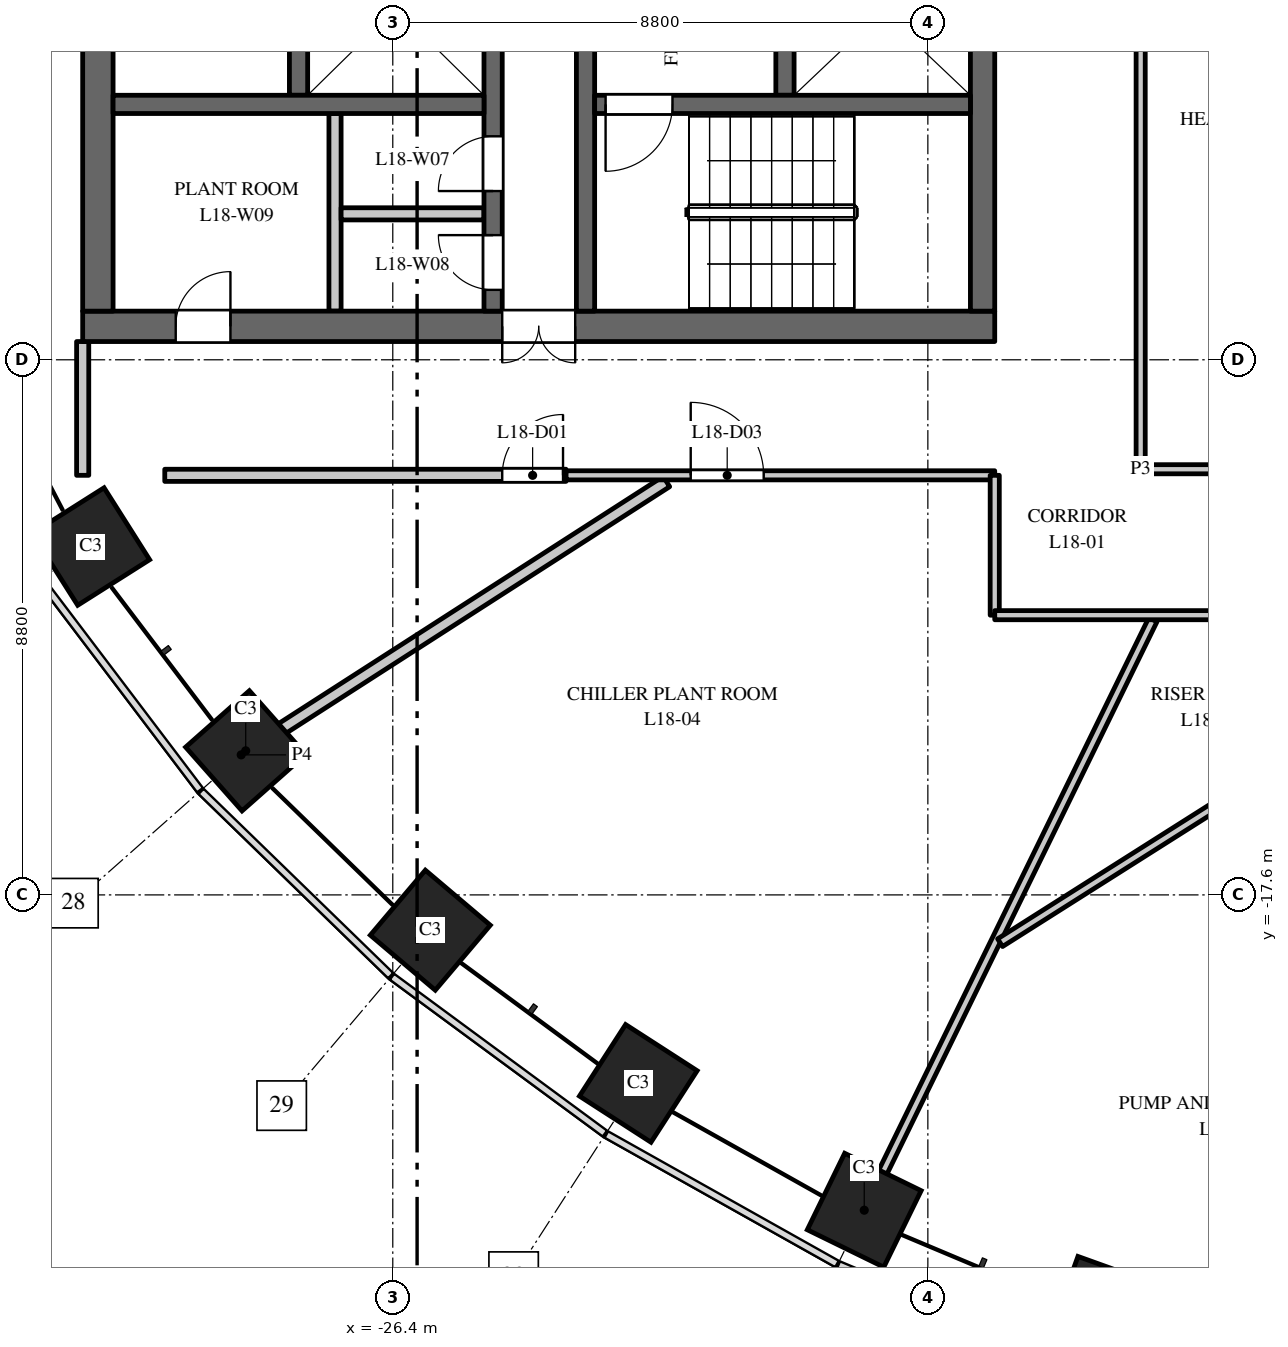
"""IFC4 building model, lengths in metres.
Left out: names, types, materials, properties, quantities, classifications, styles, units other than length and angle.
Written with IfcOpenShell. Run it as: python <this file> out.ifc"""

import sys

from ifc_helpers import new_model, si_unit, direction, frame, frame_2d, origin, origin_2d, place, context, subcontext, project, spatial, rectangle, extrude, element, fill, save


model = new_model("IFC4")
c1 = context("Model", 3, precision=1e-05, world=origin(), true_north=direction((0.0, 1.0)))
c2 = subcontext(c1, "Body", "Model", "MODEL_VIEW")
j1 = project(units=[si_unit("LENGTHUNIT", "METRE"), si_unit("PLANEANGLEUNIT", "RADIAN")], contexts=[c1])
p1 = place(None, origin())
s1 = spatial("IfcSite", under=j1, at=p1, CompositionType="ELEMENT")
p2 = place(p1, origin())
s2 = spatial("IfcBuilding", under=s1, at=p2, CompositionType="ELEMENT")
p3 = place(p2, frame((0.0, 0.0, 82.5)))
s3 = spatial("IfcBuildingStorey", under=s2, at=p3, CompositionType="ELEMENT", Elevation=82.5)
for number, where, z_axis, x_axis in (
    (1, (-31.365, -11.871, 0.0), (0.0, 0.0, 1.0), (0.535, -0.845, 0.0)),
    (2, (-28.819, -15.23, 0.0), (0.0, 0.0, 1.0), (0.663, -0.749, 0.0)),
    (3, (-25.783, -18.18, 0.0), (0.0, 0.0, 1.0), (0.763, -0.646, 0.0)),
    (4, (-22.362, -20.7, 0.0), (0.0, 0.0, 1.0), (0.84, -0.542, 0.0)),
    (5, (-18.646, -22.785, 0.0), (0.0, 0.0, 1.0), (0.898, -0.439, 0.0)),
    (6, (-14.709, -24.441, 0.0), (0.0, 0.0, 1.0), (0.941, -0.338, 0.0)),
):
    element("IfcColumn", number, at=place(p3, frame(where, z_axis=z_axis, x_axis=x_axis)), inside=s3, PredefinedType="COLUMN", context=c2, shape_type="SweptSolid", body=[
        extrude(rectangle(XDim=1.4, YDim=1.4, at=origin_2d()), origin(), (0.0, 0.0, 1.0), 5.5),
    ])
p4 = place(p3, frame((-16.5, -8.25, 0.0), z_axis=(0.0, 0.0, 1.0), x_axis=(-1.0, 0.0, 0.0)))
e7 = element("IfcWall", 7, at=p4, inside=s3, PredefinedType="SHEAR", context=c2, shape_type="SweptSolid", body=[
    extrude(rectangle(XDim=15.0, YDim=0.5, at=frame_2d((7.5, 0.0))), origin(), (0.0, 0.0, 1.0), 5.2),
])
p5 = place(p4, frame((6.9, 0.0, 0.0)))
e8 = element("IfcOpeningElement", 8, at=p5, cuts=e7, PredefinedType="OPENING", context=c2, shape_type="SweptSolid", body=[
    extrude(rectangle(XDim=1.2, YDim=2.1, at=frame_2d((0.6, 1.05))), frame((0.0, 0.26, 0.0), z_axis=(0.0, -1.0, 0.0), x_axis=(1.0, 0.0, 0.0)), (0.0, 0.0, 1.0), 0.52),
])
p6 = place(p4, frame((12.57, 0.0, 0.0)))
e9 = element("IfcOpeningElement", 9, at=p6, cuts=e7, PredefinedType="OPENING", context=c2, shape_type="SweptSolid", body=[
    extrude(rectangle(XDim=0.9, YDim=2.1, at=frame_2d((0.45, 1.05))), frame((0.0, 0.26, 0.0), z_axis=(0.0, -1.0, 0.0), x_axis=(1.0, 0.0, 0.0)), (0.0, 0.0, 1.0), 0.52),
])
p7 = place(p3, frame((-27.95, -4.45, 0.0), z_axis=(0.0, 0.0, 1.0), x_axis=(0.0, 1.0, 0.0)))
e10 = element("IfcWall", 10, at=p7, inside=s3, PredefinedType="SHEAR", context=c2, shape_type="SweptSolid", body=[
    extrude(rectangle(XDim=8.9, YDim=0.3, at=frame_2d((4.45, 0.0))), origin(), (0.0, 0.0, 1.0), 5.2),
])
p8 = place(p3, frame((-19.95, -4.45, 0.0), z_axis=(0.0, 0.0, 1.0), x_axis=(0.0, 1.0, 0.0)))
e11 = element("IfcWall", 11, at=p8, inside=s3, PredefinedType="SHEAR", context=c2, shape_type="SweptSolid", body=[
    extrude(rectangle(XDim=8.9, YDim=0.3, at=frame_2d((4.45, 0.0))), origin(), (0.0, 0.0, 1.0), 5.2),
])
p9 = place(p8, frame((0.775, 0.0, 0.0)))
e12 = element("IfcOpeningElement", 12, at=p9, cuts=e11, PredefinedType="OPENING", context=c2, shape_type="SweptSolid", body=[
    extrude(rectangle(XDim=1.2, YDim=2.1, at=frame_2d((0.6, 1.05))), frame((0.0, 0.16, 0.0), z_axis=(0.0, -1.0, 0.0), x_axis=(1.0, 0.0, 0.0)), (0.0, 0.0, 1.0), 0.32),
])
p10 = place(p8, frame((7.35, 0.0, 0.0)))
e13 = element("IfcOpeningElement", 13, at=p10, cuts=e11, PredefinedType="OPENING", context=c2, shape_type="SweptSolid", body=[
    extrude(rectangle(XDim=0.9, YDim=2.1, at=frame_2d((0.45, 1.05))), frame((0.0, 0.16, 0.0), z_axis=(0.0, -1.0, 0.0), x_axis=(1.0, 0.0, 0.0)), (0.0, 0.0, 1.0), 0.32),
])
p11 = place(p3, frame((-24.75, -8.0, 0.0), z_axis=(0.0, 0.0, 1.0), x_axis=(0.0, 1.0, 0.0)))
e14 = element("IfcWall", 14, at=p11, inside=s3, PredefinedType="SHEAR", context=c2, shape_type="SweptSolid", body=[
    extrude(rectangle(XDim=16.0, YDim=0.3, at=frame_2d((8.0, 0.0))), origin(), (0.0, 0.0, 1.0), 5.2),
])
p12 = place(p11, frame((4.425, 0.0, 0.0)))
e15 = element("IfcOpeningElement", 15, at=p12, cuts=e14, PredefinedType="OPENING", context=c2, shape_type="SweptSolid", body=[
    extrude(rectangle(XDim=1.1, YDim=2.1, at=frame_2d((0.55, 1.05))), frame((0.0, 0.16, 0.0), z_axis=(0.0, -1.0, 0.0), x_axis=(1.0, 0.0, 0.0)), (0.0, 0.0, 1.0), 0.32),
])
p13 = place(p11, frame((7.45, 0.0, 0.0)))
e16 = element("IfcOpeningElement", 16, at=p13, cuts=e14, PredefinedType="OPENING", context=c2, shape_type="SweptSolid", body=[
    extrude(rectangle(XDim=1.1, YDim=2.1, at=frame_2d((0.55, 1.05))), frame((0.0, 0.16, 0.0), z_axis=(0.0, -1.0, 0.0), x_axis=(1.0, 0.0, 0.0)), (0.0, 0.0, 1.0), 0.32),
])
p14 = place(p11, frame((10.425, 0.0, 0.0)))
e17 = element("IfcOpeningElement", 17, at=p14, cuts=e14, PredefinedType="OPENING", context=c2, shape_type="SweptSolid", body=[
    extrude(rectangle(XDim=1.2, YDim=2.1, at=frame_2d((0.6, 1.05))), frame((0.0, 0.16, 0.0), z_axis=(0.0, -1.0, 0.0), x_axis=(1.0, 0.0, 0.0)), (0.0, 0.0, 1.0), 0.32),
])
p15 = place(p11, frame((13.75, 0.0, 0.0)))
e18 = element("IfcOpeningElement", 18, at=p15, cuts=e14, PredefinedType="OPENING", context=c2, shape_type="SweptSolid", body=[
    extrude(rectangle(XDim=0.9, YDim=2.1, at=frame_2d((0.45, 1.05))), frame((0.0, 0.16, 0.0), z_axis=(0.0, -1.0, 0.0), x_axis=(1.0, 0.0, 0.0)), (0.0, 0.0, 1.0), 0.32),
])
p16 = place(p11, frame((1.975, 0.0, 0.0)))
e19 = element("IfcOpeningElement", 19, at=p16, cuts=e14, PredefinedType="OPENING", context=c2, shape_type="SweptSolid", body=[
    extrude(rectangle(XDim=0.9, YDim=2.1, at=frame_2d((0.45, 1.05))), frame((0.0, 0.16, 0.0), z_axis=(0.0, -1.0, 0.0), x_axis=(1.0, 0.0, 0.0)), (0.0, 0.0, 1.0), 0.32),
])
p17 = place(p11, frame((0.35, 0.0, 0.0)))
e20 = element("IfcOpeningElement", 20, at=p17, cuts=e14, PredefinedType="OPENING", context=c2, shape_type="SweptSolid", body=[
    extrude(rectangle(XDim=0.9, YDim=2.1, at=frame_2d((0.45, 1.05))), frame((0.0, 0.16, 0.0), z_axis=(0.0, -1.0, 0.0), x_axis=(1.0, 0.0, 0.0)), (0.0, 0.0, 1.0), 0.32),
])
p18 = place(p3, frame((-16.7, -8.0, 0.0), z_axis=(0.0, 0.0, 1.0), x_axis=(0.0, 1.0, 0.0)))
e21 = element("IfcWall", 21, at=p18, inside=s3, PredefinedType="SHEAR", context=c2, shape_type="SweptSolid", body=[
    extrude(rectangle(XDim=16.0, YDim=0.4, at=frame_2d((8.0, 0.0))), origin(), (0.0, 0.0, 1.0), 5.2),
])
p19 = place(p3, frame((-31.25, -8.0, 0.0), z_axis=(0.0, 0.0, 1.0), x_axis=(0.0, 1.0, 0.0)))
e22 = element("IfcWall", 22, at=p19, inside=s3, PredefinedType="SHEAR", context=c2, shape_type="SweptSolid", body=[
    extrude(rectangle(XDim=16.0, YDim=0.5, at=frame_2d((8.0, 0.0))), origin(), (0.0, 0.0, 1.0), 5.2),
])
p20 = place(p3, frame((-27.35, -8.0, 0.0), z_axis=(0.0, 0.0, 1.0), x_axis=(0.0, 1.0, 0.0)))
e23 = element("IfcWall", 23, at=p20, inside=s3, PredefinedType="PARTITIONING", context=c2, shape_type="SweptSolid", body=[
    extrude(rectangle(XDim=3.25, YDim=0.2, at=frame_2d((1.625, 0.0))), origin(), (0.0, 0.0, 1.0), 5.2),
])
p21 = place(p3, frame((-24.9, -6.4, 0.0), z_axis=(0.0, 0.0, 1.0), x_axis=(-1.0, 0.0, 0.0)))
e24 = element("IfcWall", 24, at=p21, inside=s3, PredefinedType="PARTITIONING", context=c2, shape_type="SweptSolid", body=[
    extrude(rectangle(XDim=2.35, YDim=0.2, at=frame_2d((1.175, 0.0))), origin(), (0.0, 0.0, 1.0), 5.2),
])
p22 = place(p3, frame((-24.9, -4.6, 0.0), z_axis=(0.0, 0.0, 1.0), x_axis=(-1.0, 0.0, 0.0)))
e25 = element("IfcWall", 25, at=p22, inside=s3, PredefinedType="SHEAR", context=c2, shape_type="SweptSolid", body=[
    extrude(rectangle(XDim=6.1, YDim=0.3, at=frame_2d((3.05, 0.0))), origin(), (0.0, 0.0, 1.0), 5.2),
])
p23 = place(p3, frame((-23.23, -8.0, 0.0), z_axis=(0.0, 0.0, 1.0), x_axis=(0.0, 1.0, 0.0)))
e26 = element("IfcWall", 26, at=p23, inside=s3, PredefinedType="SHEAR", context=c2, shape_type="SweptSolid", body=[
    extrude(rectangle(XDim=7.875, YDim=0.3, at=frame_2d((3.938, 0.0))), origin(), (0.0, 0.0, 1.0), 5.2),
])
p24 = place(p23, frame((5.15, 0.0, 0.0)))
e27 = element("IfcOpeningElement", 27, at=p24, cuts=e26, PredefinedType="OPENING", context=c2, shape_type="SweptSolid", body=[
    extrude(rectangle(XDim=1.1, YDim=2.1, at=frame_2d((0.55, 1.05))), frame((0.0, 0.16, 0.0), z_axis=(0.0, -1.0, 0.0), x_axis=(1.0, 0.0, 0.0)), (0.0, 0.0, 1.0), 0.32),
])
p25 = place(p3, frame((-16.9, -4.6, 0.0), z_axis=(0.0, 0.0, 1.0), x_axis=(-1.0, 0.0, 0.0)))
e28 = element("IfcWall", 28, at=p25, inside=s3, PredefinedType="SHEAR", context=c2, shape_type="SweptSolid", body=[
    extrude(rectangle(XDim=6.18, YDim=0.3, at=frame_2d((3.09, 0.0))), origin(), (0.0, 0.0, 1.0), 5.2),
])
p26 = place(p25, frame((4.9, 0.0, 0.0)))
e29 = element("IfcOpeningElement", 29, at=p26, cuts=e28, PredefinedType="OPENING", context=c2, shape_type="SweptSolid", body=[
    extrude(rectangle(XDim=1.1, YDim=2.1, at=frame_2d((0.55, 1.05))), frame((0.0, 0.16, 0.0), z_axis=(0.0, -1.0, 0.0), x_axis=(1.0, 0.0, 0.0)), (0.0, 0.0, 1.0), 0.32),
])
p27 = place(p3, frame((-31.5, -10.7, 0.0), z_axis=(0.0, 0.0, 1.0), x_axis=(0.0, 1.0, 0.0)))
e30 = element("IfcWall", 30, at=p27, inside=s3, PredefinedType="PARTITIONING", context=c2, shape_type="SweptSolid", body=[
    extrude(rectangle(XDim=2.2, YDim=0.2, at=frame_2d((1.1, 0.0))), origin(), (0.0, 0.0, 1.0), 5.2),
])
p28 = place(p3, frame((-30.15, -10.7, 0.0), z_axis=(0.0, 0.0, 1.0), x_axis=(1.0, 0.0, 0.0)))
e31 = element("IfcWall", 31, at=p28, inside=s3, PredefinedType="PARTITIONING", context=c2, shape_type="SweptSolid", body=[
    extrude(rectangle(XDim=6.599, YDim=0.2, at=frame_2d((3.299, 0.0))), origin(), (0.0, 0.0, 1.0), 4.4),
])
p29 = place(p28, frame((5.55, 0.0, 0.0)))
e32 = element("IfcOpeningElement", 32, at=p29, cuts=e31, PredefinedType="OPENING", context=c2, shape_type="SweptSolid", body=[
    extrude(rectangle(XDim=1.0, YDim=2.1, at=frame_2d((0.5, 1.05))), frame((0.0, 0.11, 0.0), z_axis=(0.0, -1.0, 0.0), x_axis=(1.0, 0.0, 0.0)), (0.0, 0.0, 1.0), 0.22),
])
p30 = place(p3, frame((-28.893, -15.297, 0.0), z_axis=(0.0, 0.0, 1.0), x_axis=(0.841258622477, 0.54063289773, 0.0)))
e33 = element("IfcWall", 33, at=p30, inside=s3, PredefinedType="PARTITIONING", context=c2, shape_type="SweptSolid", body=[
    extrude(rectangle(XDim=8.313, YDim=0.2, at=frame_2d((4.156, 0.0))), origin(), (0.0, 0.0, 1.0), 5.2),
])
p31 = place(p3, frame((-23.55, -10.7, 0.0), z_axis=(0.0, 0.0, 1.0), x_axis=(1.0, 0.0, 0.0)))
e34 = element("IfcWall", 34, at=p31, inside=s3, PredefinedType="PARTITIONING", context=c2, shape_type="SweptSolid", body=[
    extrude(rectangle(XDim=7.05, YDim=0.15, at=frame_2d((3.525, 0.0))), origin(), (0.0, 0.0, 1.0), 5.2),
])
p32 = place(p31, frame((2.05, 0.0, 0.0)))
e35 = element("IfcOpeningElement", 35, at=p32, cuts=e34, PredefinedType="OPENING", context=c2, shape_type="SweptSolid", body=[
    extrude(rectangle(XDim=1.2, YDim=2.1, at=frame_2d((0.6, 1.05))), frame((0.0, 0.085, 0.0), z_axis=(0.0, -1.0, 0.0), x_axis=(1.0, 0.0, 0.0)), (0.0, 0.0, 1.0), 0.17),
])
p33 = place(p3, frame((-18.69, -22.875, 0.0), z_axis=(0.0, 0.0, 1.0), x_axis=(0.439201300969, 0.898388678261, 0.0)))
e36 = element("IfcWall", 36, at=p33, inside=s3, PredefinedType="PARTITIONING", context=c2, shape_type="SweptSolid", body=[
    extrude(rectangle(XDim=10.908, YDim=0.15, at=frame_2d((5.454, 0.0))), origin(), (0.0, 0.0, 1.0), 5.2),
])
p34 = place(p3, frame((-16.412, -18.386, 0.0), z_axis=(0.0, 0.0, 1.0), x_axis=(0.844855771647, 0.534994135588, 0.0)))
e37 = element("IfcWall", 37, at=p34, inside=s3, PredefinedType="PARTITIONING", context=c2, shape_type="SweptSolid", body=[
    extrude(rectangle(XDim=9.924, YDim=0.15, at=frame_2d((4.962, 0.0))), origin(), (0.0, 0.0, 1.0), 4.35),
])
p35 = place(p3, frame((-16.5, -13.0, 0.0), z_axis=(0.0, 0.0, 1.0), x_axis=(0.0, 1.0, 0.0)))
e38 = element("IfcWall", 38, at=p35, inside=s3, PredefinedType="PARTITIONING", context=c2, shape_type="SweptSolid", body=[
    extrude(rectangle(XDim=2.3, YDim=0.15, at=frame_2d((1.15, 0.0))), origin(), (0.0, 0.0, 1.0), 4.25),
])
p36 = place(p3, frame((-16.5, -13.0, 0.0), z_axis=(0.0, 0.0, 1.0), x_axis=(1.0, 0.0, 0.0)))
e39 = element("IfcWall", 39, at=p36, inside=s3, PredefinedType="PARTITIONING", context=c2, shape_type="SweptSolid", body=[
    extrude(rectangle(XDim=12.021, YDim=0.15, at=frame_2d((6.01, 0.0))), origin(), (0.0, 0.0, 1.0), 4.35),
])
p37 = place(p36, frame((9.239, 0.0, 0.0)))
e40 = element("IfcOpeningElement", 40, at=p37, cuts=e39, PredefinedType="OPENING", context=c2, shape_type="SweptSolid", body=[
    extrude(rectangle(XDim=1.2, YDim=2.1, at=frame_2d((0.6, 1.05))), frame((0.0, 0.085, 0.0), z_axis=(0.0, -1.0, 0.0), x_axis=(1.0, 0.0, 0.0)), (0.0, 0.0, 1.0), 0.17),
])
p38 = place(p36, frame((5.279, 0.0, 0.0)))
e41 = element("IfcOpeningElement", 41, at=p38, cuts=e39, PredefinedType="OPENING", context=c2, shape_type="SweptSolid", body=[
    extrude(rectangle(XDim=1.0, YDim=2.1, at=frame_2d((0.5, 1.05))), frame((0.0, 0.085, 0.0), z_axis=(0.0, -1.0, 0.0), x_axis=(1.0, 0.0, 0.0)), (0.0, 0.0, 1.0), 0.17),
])
p39 = place(p3, frame((-14.1, -10.6, 0.0), z_axis=(0.0, 0.0, 1.0), x_axis=(0.0, 1.0, 0.0)))
e42 = element("IfcWall", 42, at=p39, inside=s3, PredefinedType="PARTITIONING", context=c2, shape_type="SweptSolid", body=[
    extrude(rectangle(XDim=21.2, YDim=0.15, at=frame_2d((10.6, 0.0))), origin(), (0.0, 0.0, 1.0), 4.25),
])
p40 = place(p39, frame((19.4, 0.0, 0.0)))
e43 = element("IfcOpeningElement", 43, at=p40, cuts=e42, PredefinedType="OPENING", context=c2, shape_type="SweptSolid", body=[
    extrude(rectangle(XDim=1.2, YDim=2.1, at=frame_2d((0.6, 1.05))), frame((0.0, 0.085, 0.0), z_axis=(0.0, -1.0, 0.0), x_axis=(1.0, 0.0, 0.0)), (0.0, 0.0, 1.0), 0.17),
])
p41 = place(p3, frame((-14.1, -10.6, 0.0), z_axis=(0.0, 0.0, 1.0), x_axis=(1.0, 0.0, 0.0)))
e44 = element("IfcWall", 44, at=p41, inside=s3, PredefinedType="PARTITIONING", context=c2, shape_type="SweptSolid", body=[
    extrude(rectangle(XDim=28.2, YDim=0.15, at=frame_2d((14.1, 0.0))), origin(), (0.0, 0.0, 1.0), 4.35),
])
p42 = place(p41, frame((8.22, 0.0, 0.0)))
e45 = element("IfcOpeningElement", 45, at=p42, cuts=e44, PredefinedType="OPENING", context=c2, shape_type="SweptSolid", body=[
    extrude(rectangle(XDim=1.0, YDim=2.1, at=frame_2d((0.5, 1.05))), frame((0.0, 0.085, 0.0), z_axis=(0.0, -1.0, 0.0), x_axis=(1.0, 0.0, 0.0)), (0.0, 0.0, 1.0), 0.17),
])
p43 = place(p41, frame((12.92, 0.0, 0.0)))
e46 = element("IfcOpeningElement", 46, at=p43, cuts=e44, PredefinedType="OPENING", context=c2, shape_type="SweptSolid", body=[
    extrude(rectangle(XDim=1.0, YDim=2.1, at=frame_2d((0.5, 1.05))), frame((0.0, 0.085, 0.0), z_axis=(0.0, -1.0, 0.0), x_axis=(1.0, 0.0, 0.0)), (0.0, 0.0, 1.0), 0.17),
])
p44 = place(p41, frame((17.62, 0.0, 0.0)))
e47 = element("IfcOpeningElement", 47, at=p44, cuts=e44, PredefinedType="OPENING", context=c2, shape_type="SweptSolid", body=[
    extrude(rectangle(XDim=1.0, YDim=2.1, at=frame_2d((0.5, 1.05))), frame((0.0, 0.085, 0.0), z_axis=(0.0, -1.0, 0.0), x_axis=(1.0, 0.0, 0.0)), (0.0, 0.0, 1.0), 0.17),
])
p45 = place(p26, origin())
e48 = element("IfcDoor", 48, at=p45, inside=s3, OperationType="SINGLE_SWING_LEFT", PredefinedType="DOOR", context=c2, shape_type="SweptSolid", body=[
    extrude(rectangle(XDim=1.1, YDim=2.1, at=frame_2d((0.55, 1.05))), frame((0.0, 0.025, 0.0), z_axis=(0.0, -1.0, 0.0), x_axis=(1.0, 0.0, 0.0)), (0.0, 0.0, 1.0), 0.05),
])
fill(e29, e48)
p46 = place(p5, origin())
e49 = element("IfcDoor", 49, at=p46, inside=s3, OperationType="DOUBLE_DOOR_DOUBLE_SWING", PredefinedType="DOOR", context=c2, shape_type="SweptSolid", body=[
    extrude(rectangle(XDim=1.2, YDim=2.1, at=frame_2d((0.6, 1.05))), frame((0.0, 0.025, 0.0), z_axis=(0.0, -1.0, 0.0), x_axis=(1.0, 0.0, 0.0)), (0.0, 0.0, 1.0), 0.05),
])
fill(e8, e49)
p47 = place(p16, origin())
e50 = element("IfcDoor", 50, at=p47, inside=s3, OperationType="SINGLE_SWING_RIGHT", PredefinedType="DOOR", context=c2, shape_type="SweptSolid", body=[
    extrude(rectangle(XDim=0.9, YDim=2.1, at=frame_2d((0.45, 1.05))), frame((0.0, 0.025, 0.0), z_axis=(0.0, -1.0, 0.0), x_axis=(1.0, 0.0, 0.0)), (0.0, 0.0, 1.0), 0.05),
])
fill(e19, e50)
p48 = place(p17, origin())
e51 = element("IfcDoor", 51, at=p48, inside=s3, OperationType="SINGLE_SWING_LEFT", PredefinedType="DOOR", context=c2, shape_type="SweptSolid", body=[
    extrude(rectangle(XDim=0.9, YDim=2.1, at=frame_2d((0.45, 1.05))), frame((0.0, 0.025, 0.0), z_axis=(0.0, -1.0, 0.0), x_axis=(1.0, 0.0, 0.0)), (0.0, 0.0, 1.0), 0.05),
])
fill(e20, e51)
p49 = place(p6, origin())
e52 = element("IfcDoor", 52, at=p49, inside=s3, OperationType="SINGLE_SWING_LEFT", PredefinedType="DOOR", context=c2, shape_type="SweptSolid", body=[
    extrude(rectangle(XDim=0.9, YDim=2.1, at=frame_2d((0.45, 1.05))), frame((0.0, 0.025, 0.0), z_axis=(0.0, -1.0, 0.0), x_axis=(1.0, 0.0, 0.0)), (0.0, 0.0, 1.0), 0.05),
])
fill(e9, e52)
p50 = place(p29, origin())
e53 = element("IfcDoor", 53, at=p50, inside=s3, OperationType="SINGLE_SWING_RIGHT", PredefinedType="DOOR", context=c2, shape_type="SweptSolid", body=[
    extrude(rectangle(XDim=1.0, YDim=2.1, at=frame_2d((0.5, 1.05))), frame((0.0, 0.025, 0.0), z_axis=(0.0, -1.0, 0.0), x_axis=(1.0, 0.0, 0.0)), (0.0, 0.0, 1.0), 0.05),
])
fill(e32, e53)
p51 = place(p32, origin())
e54 = element("IfcDoor", 54, at=p51, inside=s3, OperationType="SINGLE_SWING_LEFT", PredefinedType="DOOR", context=c2, shape_type="SweptSolid", body=[
    extrude(rectangle(XDim=1.2, YDim=2.1, at=frame_2d((0.6, 1.05))), frame((0.0, 0.025, 0.0), z_axis=(0.0, -1.0, 0.0), x_axis=(1.0, 0.0, 0.0)), (0.0, 0.0, 1.0), 0.05),
])
fill(e35, e54)
save(model, sys.argv[1])
